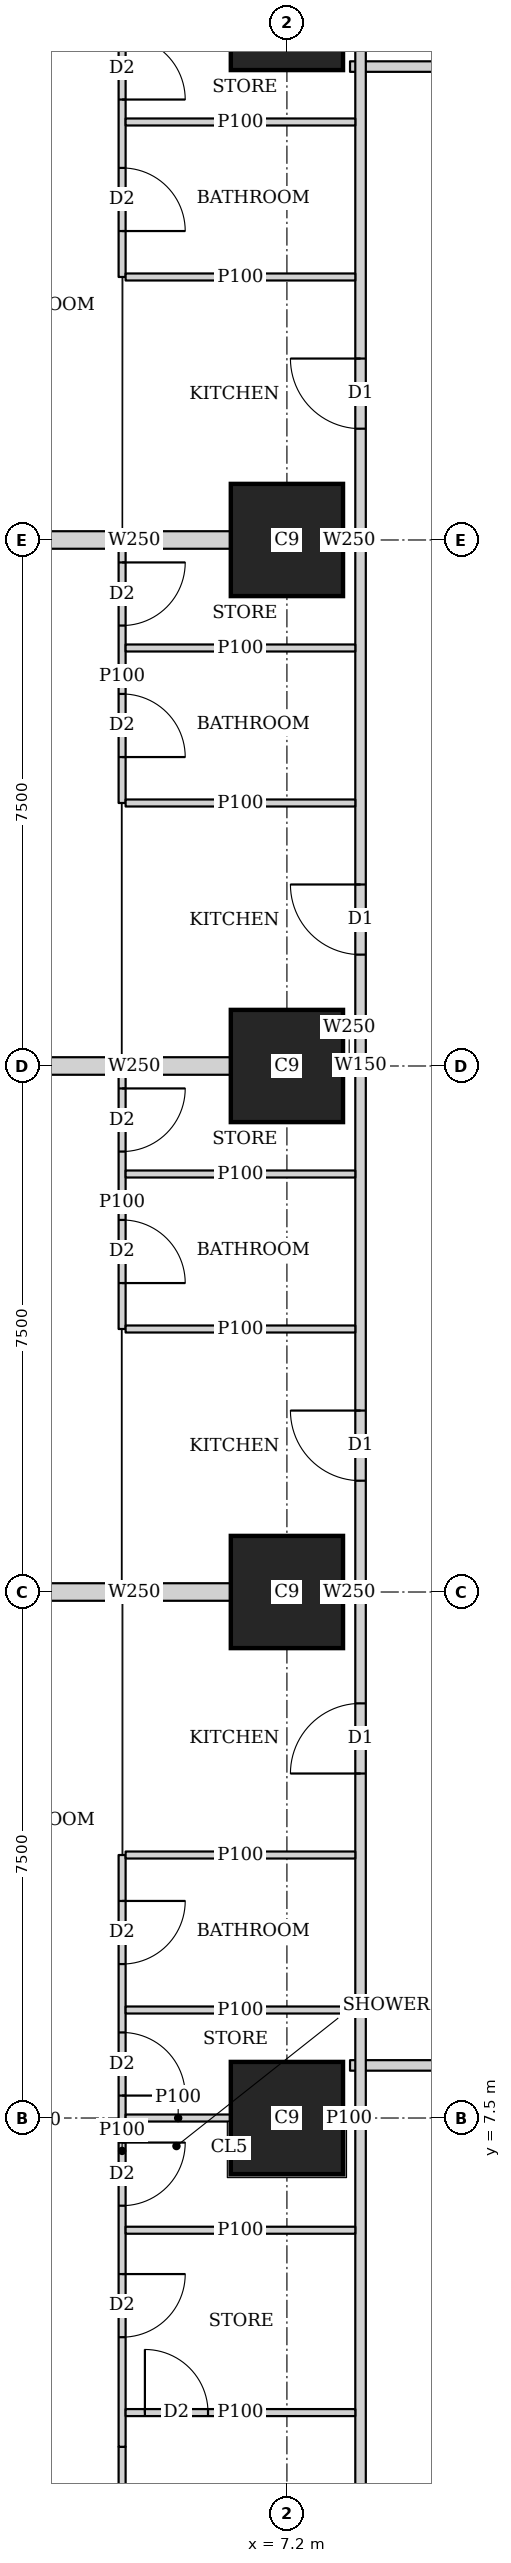
"""IFC4 building model, lengths in metres.
Left out: names, types, materials, properties, quantities, classifications, styles, units other than length and angle.
Written with IfcOpenShell. Run it as: python <this file> out.ifc"""

import sys

from ifc_helpers import new_model, si_unit, direction, frame, frame_2d, origin, origin_2d, place, context, subcontext, project, spatial, rectangle, extrude, element, fill, save


model = new_model("IFC4")
c1 = context("Model", 3, precision=1e-05, world=origin(), true_north=direction((0.0, 1.0)))
c2 = subcontext(c1, "Body", "Model", "MODEL_VIEW")
j1 = project(units=[si_unit("LENGTHUNIT", "METRE"), si_unit("PLANEANGLEUNIT", "RADIAN")], contexts=[c1])
p1 = place(None, origin())
s1 = spatial("IfcSite", under=j1, at=p1, CompositionType="ELEMENT")
p2 = place(p1, origin())
s2 = spatial("IfcBuilding", under=s1, at=p2, CompositionType="ELEMENT")
p3 = place(p2, frame((0.0, 0.0, 126.65)))
s3 = spatial("IfcBuildingStorey", under=s2, at=p3, CompositionType="ELEMENT", Elevation=126.65)
for number, where, z_axis, x_axis in (
    (1, (7.2, 7.5, 0.0), (0.0, 0.0, 1.0), (1.0, 0.0, 0.0)),
    (2, (7.2, 15.0, 0.0), (0.0, 0.0, 1.0), (1.0, 0.0, 0.0)),
    (3, (7.2, 22.5, 0.0), (0.0, 0.0, 1.0), (1.0, 0.0, 0.0)),
    (4, (7.2, 30.0, 0.0), (0.0, 0.0, 1.0), (1.0, 0.0, 0.0)),
    (5, (7.2, 37.5, 0.0), (0.0, 0.0, 1.0), (1.0, 0.0, 0.0)),
):
    element("IfcColumn", number, at=place(p3, frame(where, z_axis=z_axis, x_axis=x_axis)), inside=s3, PredefinedType="COLUMN", context=c2, shape_type="SweptSolid", body=[
        extrude(rectangle(XDim=1.6, YDim=1.6, at=origin_2d()), origin(), (0.0, 0.0, 1.0), 3.75),
    ])
p4 = place(p3, frame((8.25, 2.126, 0.0), z_axis=(0.0, 0.0, 1.0), x_axis=(0.0, 1.0, 0.0)))
e6 = element("IfcWall", 6, at=p4, inside=s3, PredefinedType="SOLIDWALL", context=c2, shape_type="SweptSolid", body=[
    extrude(rectangle(XDim=40.773, YDim=0.15, at=frame_2d((20.386, 0.0))), origin(), (0.0, 0.0, 1.0), 3.45),
])
p5 = place(p4, frame((10.286, 0.0, 0.0)))
e7 = element("IfcOpeningElement", 7, at=p5, cuts=e6, PredefinedType="OPENING", context=c2, shape_type="SweptSolid", body=[
    extrude(rectangle(XDim=1.0, YDim=2.1, at=frame_2d((0.5, 1.05))), frame((0.0, 0.085, 0.0), z_axis=(0.0, -1.0, 0.0), x_axis=(1.0, 0.0, 0.0)), (0.0, 0.0, 1.0), 0.17),
])
p6 = place(p4, frame((14.461, 0.0, 0.0)))
e8 = element("IfcOpeningElement", 8, at=p6, cuts=e6, PredefinedType="OPENING", context=c2, shape_type="SweptSolid", body=[
    extrude(rectangle(XDim=1.0, YDim=2.1, at=frame_2d((0.5, 1.05))), frame((0.0, 0.085, 0.0), z_axis=(0.0, -1.0, 0.0), x_axis=(1.0, 0.0, 0.0)), (0.0, 0.0, 1.0), 0.17),
])
p7 = place(p4, frame((21.962, 0.0, 0.0)))
e9 = element("IfcOpeningElement", 9, at=p7, cuts=e6, PredefinedType="OPENING", context=c2, shape_type="SweptSolid", body=[
    extrude(rectangle(XDim=1.0, YDim=2.1, at=frame_2d((0.5, 1.05))), frame((0.0, 0.085, 0.0), z_axis=(0.0, -1.0, 0.0), x_axis=(1.0, 0.0, 0.0)), (0.0, 0.0, 1.0), 0.17),
])
p8 = place(p4, frame((29.461, 0.0, 0.0)))
e10 = element("IfcOpeningElement", 10, at=p8, cuts=e6, PredefinedType="OPENING", context=c2, shape_type="SweptSolid", body=[
    extrude(rectangle(XDim=1.0, YDim=2.1, at=frame_2d((0.5, 1.05))), frame((0.0, 0.085, 0.0), z_axis=(0.0, -1.0, 0.0), x_axis=(1.0, 0.0, 0.0)), (0.0, 0.0, 1.0), 0.17),
])
p9 = place(p3, frame((13.599, 8.25, 0.0), z_axis=(0.0, 0.0, 1.0), x_axis=(-1.0, 0.0, 0.0)))
e11 = element("IfcWall", 11, at=p9, inside=s3, PredefinedType="SOLIDWALL", context=c2, shape_type="SweptSolid", body=[
    extrude(rectangle(XDim=5.499, YDim=0.15, at=frame_2d((2.75, 0.0))), origin(), (0.0, 0.0, 1.0), 3.45),
])
p10 = place(p9, frame((1.774, 0.0, 0.0)))
e12 = element("IfcOpeningElement", 12, at=p10, cuts=e11, PredefinedType="OPENING", context=c2, shape_type="SweptSolid", body=[
    extrude(rectangle(XDim=1.0, YDim=2.1, at=frame_2d((0.5, 1.05))), frame((0.0, 0.085, 0.0), z_axis=(0.0, -1.0, 0.0), x_axis=(1.0, 0.0, 0.0)), (0.0, 0.0, 1.0), 0.17),
])
p11 = place(p3, frame((8.1, 36.75, 0.0), z_axis=(0.0, 0.0, 1.0), x_axis=(1.0, 0.0, 0.0)))
e13 = element("IfcWall", 13, at=p11, inside=s3, PredefinedType="SOLIDWALL", context=c2, shape_type="SweptSolid", body=[
    extrude(rectangle(XDim=5.499, YDim=0.15, at=frame_2d((2.75, 0.0))), origin(), (0.0, 0.0, 1.0), 3.45),
])
p12 = place(p11, frame((2.725, 0.0, 0.0)))
e14 = element("IfcOpeningElement", 14, at=p12, cuts=e13, PredefinedType="OPENING", context=c2, shape_type="SweptSolid", body=[
    extrude(rectangle(XDim=1.0, YDim=2.1, at=frame_2d((0.5, 1.05))), frame((0.0, 0.085, 0.0), z_axis=(0.0, -1.0, 0.0), x_axis=(1.0, 0.0, 0.0)), (0.0, 0.0, 1.0), 0.17),
])
p13 = place(p3, frame((4.85, 0.326, 0.0), z_axis=(0.0, 0.0, 1.0), x_axis=(0.0, 1.0, 0.0)))
e15 = element("IfcWall", 15, at=p13, inside=s3, PredefinedType="PARTITIONING", context=c2, shape_type="SweptSolid", body=[
    extrude(rectangle(XDim=2.486, YDim=0.1, at=frame_2d((1.243, 0.0))), origin(), (0.0, 0.0, 1.0), 2.0),
])
p14 = place(p3, frame((4.85, 2.812, 0.0), z_axis=(0.0, 0.0, 1.0), x_axis=(0.0, 1.0, 0.0)))
e16 = element("IfcWall", 16, at=p14, inside=s3, PredefinedType="PARTITIONING", context=c2, shape_type="SweptSolid", body=[
    extrude(rectangle(XDim=8.438, YDim=0.1, at=frame_2d((4.219, 0.0))), origin(), (0.0, 0.0, 1.0), 3.45),
])
p15 = place(p14, frame((6.883, 0.0, 0.0)))
e17 = element("IfcOpeningElement", 17, at=p15, cuts=e16, PredefinedType="OPENING", context=c2, shape_type="SweptSolid", body=[
    extrude(rectangle(XDim=0.9, YDim=2.1, at=frame_2d((0.45, 1.05))), frame((0.0, 0.06, 0.0), z_axis=(0.0, -1.0, 0.0), x_axis=(1.0, 0.0, 0.0)), (0.0, 0.0, 1.0), 0.12),
])
p16 = place(p14, frame((3.438, 0.0, 0.0)))
e18 = element("IfcOpeningElement", 18, at=p16, cuts=e16, PredefinedType="OPENING", context=c2, shape_type="SweptSolid", body=[
    extrude(rectangle(XDim=0.9, YDim=2.1, at=frame_2d((0.45, 1.05))), frame((0.0, 0.06, 0.0), z_axis=(0.0, -1.0, 0.0), x_axis=(1.0, 0.0, 0.0)), (0.0, 0.0, 1.0), 0.12),
])
p17 = place(p14, frame((5.008, 0.0, 0.0)))
e19 = element("IfcOpeningElement", 19, at=p17, cuts=e16, PredefinedType="OPENING", context=c2, shape_type="SweptSolid", body=[
    extrude(rectangle(XDim=0.9, YDim=2.1, at=frame_2d((0.45, 1.05))), frame((0.0, 0.06, 0.0), z_axis=(0.0, -1.0, 0.0), x_axis=(1.0, 0.0, 0.0)), (0.0, 0.0, 1.0), 0.12),
])
p18 = place(p14, frame((1.563, 0.0, 0.0)))
e20 = element("IfcOpeningElement", 20, at=p18, cuts=e16, PredefinedType="OPENING", context=c2, shape_type="SweptSolid", body=[
    extrude(rectangle(XDim=0.9, YDim=2.1, at=frame_2d((0.45, 1.05))), frame((0.0, 0.06, 0.0), z_axis=(0.0, -1.0, 0.0), x_axis=(1.0, 0.0, 0.0)), (0.0, 0.0, 1.0), 0.12),
])
p19 = place(p3, frame((4.9, 7.5, 0.0), z_axis=(0.0, 0.0, 1.0), x_axis=(1.0, 0.0, 0.0)))
e21 = element("IfcWall", 21, at=p19, inside=s3, PredefinedType="PARTITIONING", context=c2, shape_type="SweptSolid", body=[
    extrude(rectangle(XDim=1.499, YDim=0.1, at=frame_2d((0.75, 0.0))), origin(), (0.0, 0.0, 1.0), 3.45),
])
p20 = place(p3, frame((8.001, 7.5, 0.0), z_axis=(0.0, 0.0, 1.0), x_axis=(1.0, 0.0, 0.0)))
e22 = element("IfcWall", 22, at=p20, inside=s3, PredefinedType="PARTITIONING", context=c2, shape_type="SweptSolid", body=[
    extrude(rectangle(XDim=0.174, YDim=0.1, at=frame_2d((0.087, 0.0))), origin(), (0.0, 0.0, 1.0), 3.45),
])
for number, where, z_axis, x_axis in (
    (23, (4.9, 11.25, 0.0), (0.0, 0.0, 1.0), (1.0, 0.0, 0.0)),
    (24, (4.9, 9.04, 0.0), (0.0, 0.0, 1.0), (1.0, 0.0, 0.0)),
    (25, (4.9, 5.9, 0.0), (0.0, 0.0, 1.0), (1.0, 0.0, 0.0)),
):
    element("IfcWall", number, at=place(p3, frame(where, z_axis=z_axis, x_axis=x_axis)), inside=s3, PredefinedType="PARTITIONING", context=c2, shape_type="SweptSolid", body=[
        extrude(rectangle(XDim=3.275, YDim=0.1, at=frame_2d((1.638, 0.0))), origin(), (0.0, 0.0, 1.0), 3.45),
    ])
p21 = place(p3, frame((4.85, 18.75, 0.0), z_axis=(0.0, 0.0, 1.0), x_axis=(0.0, 1.0, 0.0)))
e26 = element("IfcWall", 26, at=p21, inside=s3, PredefinedType="PARTITIONING", context=c2, shape_type="SweptSolid", body=[
    extrude(rectangle(XDim=3.625, YDim=0.1, at=frame_2d((1.812, 0.0))), origin(), (0.0, 0.0, 1.0), 3.45),
])
p22 = place(p21, frame((0.655, 0.0, 0.0)))
e27 = element("IfcOpeningElement", 27, at=p22, cuts=e26, PredefinedType="OPENING", context=c2, shape_type="SweptSolid", body=[
    extrude(rectangle(XDim=0.9, YDim=2.1, at=frame_2d((0.45, 1.05))), frame((0.0, 0.06, 0.0), z_axis=(0.0, -1.0, 0.0), x_axis=(1.0, 0.0, 0.0)), (0.0, 0.0, 1.0), 0.12),
])
p23 = place(p21, frame((2.53, 0.0, 0.0)))
e28 = element("IfcOpeningElement", 28, at=p23, cuts=e26, PredefinedType="OPENING", context=c2, shape_type="SweptSolid", body=[
    extrude(rectangle(XDim=0.9, YDim=2.1, at=frame_2d((0.45, 1.05))), frame((0.0, 0.06, 0.0), z_axis=(0.0, -1.0, 0.0), x_axis=(1.0, 0.0, 0.0)), (0.0, 0.0, 1.0), 0.12),
])
for number, where, z_axis, x_axis in (
    (29, (4.9, 18.75, 0.0), (0.0, 0.0, 1.0), (1.0, 0.0, 0.0)),
    (30, (4.9, 20.96, 0.0), (0.0, 0.0, 1.0), (1.0, 0.0, 0.0)),
):
    element("IfcWall", number, at=place(p3, frame(where, z_axis=z_axis, x_axis=x_axis)), inside=s3, PredefinedType="PARTITIONING", context=c2, shape_type="SweptSolid", body=[
        extrude(rectangle(XDim=3.275, YDim=0.1, at=frame_2d((1.638, 0.0))), origin(), (0.0, 0.0, 1.0), 3.45),
    ])
p24 = place(p3, frame((3.65, 15.0, 0.0), z_axis=(0.0, 0.0, 1.0), x_axis=(1.0, 0.0, 0.0)))
e31 = element("IfcWall", 31, at=p24, inside=s3, PredefinedType="SOLIDWALL", context=c2, shape_type="SweptSolid", body=[
    extrude(rectangle(XDim=2.749, YDim=0.25, at=frame_2d((1.375, 0.0))), origin(), (0.0, 0.0, 1.0), 3.45),
])
p25 = place(p3, frame((8.001, 15.0, 0.0), z_axis=(0.0, 0.0, 1.0), x_axis=(1.0, 0.0, 0.0)))
e32 = element("IfcWall", 32, at=p25, inside=s3, PredefinedType="SOLIDWALL", context=c2, shape_type="SweptSolid", body=[
    extrude(rectangle(XDim=0.174, YDim=0.25, at=frame_2d((0.087, 0.0))), origin(), (0.0, 0.0, 1.0), 3.45),
])
p26 = place(p3, frame((4.85, 26.25, 0.0), z_axis=(0.0, 0.0, 1.0), x_axis=(0.0, 1.0, 0.0)))
e33 = element("IfcWall", 33, at=p26, inside=s3, PredefinedType="PARTITIONING", context=c2, shape_type="SweptSolid", body=[
    extrude(rectangle(XDim=3.625, YDim=0.1, at=frame_2d((1.812, 0.0))), origin(), (0.0, 0.0, 1.0), 3.45),
])
p27 = place(p26, frame((0.655, 0.0, 0.0)))
e34 = element("IfcOpeningElement", 34, at=p27, cuts=e33, PredefinedType="OPENING", context=c2, shape_type="SweptSolid", body=[
    extrude(rectangle(XDim=0.9, YDim=2.1, at=frame_2d((0.45, 1.05))), frame((0.0, 0.06, 0.0), z_axis=(0.0, -1.0, 0.0), x_axis=(1.0, 0.0, 0.0)), (0.0, 0.0, 1.0), 0.12),
])
p28 = place(p26, frame((2.53, 0.0, 0.0)))
e35 = element("IfcOpeningElement", 35, at=p28, cuts=e33, PredefinedType="OPENING", context=c2, shape_type="SweptSolid", body=[
    extrude(rectangle(XDim=0.9, YDim=2.1, at=frame_2d((0.45, 1.05))), frame((0.0, 0.06, 0.0), z_axis=(0.0, -1.0, 0.0), x_axis=(1.0, 0.0, 0.0)), (0.0, 0.0, 1.0), 0.12),
])
for number, where, z_axis, x_axis in (
    (36, (4.9, 26.25, 0.0), (0.0, 0.0, 1.0), (1.0, 0.0, 0.0)),
    (37, (4.9, 28.46, 0.0), (0.0, 0.0, 1.0), (1.0, 0.0, 0.0)),
):
    element("IfcWall", number, at=place(p3, frame(where, z_axis=z_axis, x_axis=x_axis)), inside=s3, PredefinedType="PARTITIONING", context=c2, shape_type="SweptSolid", body=[
        extrude(rectangle(XDim=3.275, YDim=0.1, at=frame_2d((1.638, 0.0))), origin(), (0.0, 0.0, 1.0), 3.45),
    ])
p29 = place(p3, frame((3.65, 22.5, 0.0), z_axis=(0.0, 0.0, 1.0), x_axis=(1.0, 0.0, 0.0)))
e38 = element("IfcWall", 38, at=p29, inside=s3, PredefinedType="SOLIDWALL", context=c2, shape_type="SweptSolid", body=[
    extrude(rectangle(XDim=2.749, YDim=0.25, at=frame_2d((1.375, 0.0))), origin(), (0.0, 0.0, 1.0), 3.45),
])
p30 = place(p3, frame((8.001, 22.5, 0.0), z_axis=(0.0, 0.0, 1.0), x_axis=(1.0, 0.0, 0.0)))
e39 = element("IfcWall", 39, at=p30, inside=s3, PredefinedType="SOLIDWALL", context=c2, shape_type="SweptSolid", body=[
    extrude(rectangle(XDim=0.174, YDim=0.25, at=frame_2d((0.087, 0.0))), origin(), (0.0, 0.0, 1.0), 3.45),
])
p31 = place(p3, frame((4.85, 33.75, 0.0), z_axis=(0.0, 0.0, 1.0), x_axis=(0.0, 1.0, 0.0)))
e40 = element("IfcWall", 40, at=p31, inside=s3, PredefinedType="PARTITIONING", context=c2, shape_type="SweptSolid", body=[
    extrude(rectangle(XDim=8.449, YDim=0.1, at=frame_2d((4.225, 0.0))), origin(), (0.0, 0.0, 1.0), 3.45),
])
p32 = place(p31, frame((0.655, 0.0, 0.0)))
e41 = element("IfcOpeningElement", 41, at=p32, cuts=e40, PredefinedType="OPENING", context=c2, shape_type="SweptSolid", body=[
    extrude(rectangle(XDim=0.9, YDim=2.1, at=frame_2d((0.45, 1.05))), frame((0.0, 0.06, 0.0), z_axis=(0.0, -1.0, 0.0), x_axis=(1.0, 0.0, 0.0)), (0.0, 0.0, 1.0), 0.12),
])
p33 = place(p31, frame((4.1, 0.0, 0.0)))
e42 = element("IfcOpeningElement", 42, at=p33, cuts=e40, PredefinedType="OPENING", context=c2, shape_type="SweptSolid", body=[
    extrude(rectangle(XDim=0.9, YDim=2.1, at=frame_2d((0.45, 1.05))), frame((0.0, 0.06, 0.0), z_axis=(0.0, -1.0, 0.0), x_axis=(1.0, 0.0, 0.0)), (0.0, 0.0, 1.0), 0.12),
])
p34 = place(p31, frame((2.53, 0.0, 0.0)))
e43 = element("IfcOpeningElement", 43, at=p34, cuts=e40, PredefinedType="OPENING", context=c2, shape_type="SweptSolid", body=[
    extrude(rectangle(XDim=0.9, YDim=2.1, at=frame_2d((0.45, 1.05))), frame((0.0, 0.06, 0.0), z_axis=(0.0, -1.0, 0.0), x_axis=(1.0, 0.0, 0.0)), (0.0, 0.0, 1.0), 0.12),
])
p35 = place(p31, frame((5.975, 0.0, 0.0)))
e44 = element("IfcOpeningElement", 44, at=p35, cuts=e40, PredefinedType="OPENING", context=c2, shape_type="SweptSolid", body=[
    extrude(rectangle(XDim=0.9, YDim=2.1, at=frame_2d((0.45, 1.05))), frame((0.0, 0.06, 0.0), z_axis=(0.0, -1.0, 0.0), x_axis=(1.0, 0.0, 0.0)), (0.0, 0.0, 1.0), 0.12),
])
for number, where, z_axis, x_axis in (
    (45, (4.9, 33.75, 0.0), (0.0, 0.0, 1.0), (1.0, 0.0, 0.0)),
    (46, (4.9, 35.96, 0.0), (0.0, 0.0, 1.0), (1.0, 0.0, 0.0)),
):
    element("IfcWall", number, at=place(p3, frame(where, z_axis=z_axis, x_axis=x_axis)), inside=s3, PredefinedType="PARTITIONING", context=c2, shape_type="SweptSolid", body=[
        extrude(rectangle(XDim=3.275, YDim=0.1, at=frame_2d((1.638, 0.0))), origin(), (0.0, 0.0, 1.0), 3.45),
    ])
p36 = place(p3, frame((3.65, 30.0, 0.0), z_axis=(0.0, 0.0, 1.0), x_axis=(1.0, 0.0, 0.0)))
e47 = element("IfcWall", 47, at=p36, inside=s3, PredefinedType="SOLIDWALL", context=c2, shape_type="SweptSolid", body=[
    extrude(rectangle(XDim=2.749, YDim=0.25, at=frame_2d((1.375, 0.0))), origin(), (0.0, 0.0, 1.0), 3.45),
])
p37 = place(p3, frame((8.001, 30.0, 0.0), z_axis=(0.0, 0.0, 1.0), x_axis=(1.0, 0.0, 0.0)))
e48 = element("IfcWall", 48, at=p37, inside=s3, PredefinedType="SOLIDWALL", context=c2, shape_type="SweptSolid", body=[
    extrude(rectangle(XDim=0.174, YDim=0.25, at=frame_2d((0.087, 0.0))), origin(), (0.0, 0.0, 1.0), 3.45),
])
p38 = place(p3, frame((8.175, 3.3, 0.0), z_axis=(0.0, 0.0, 1.0), x_axis=(-1.0, 0.0, 0.0)))
e49 = element("IfcWall", 49, at=p38, inside=s3, PredefinedType="PARTITIONING", context=c2, shape_type="SweptSolid", body=[
    extrude(rectangle(XDim=3.275, YDim=0.1, at=frame_2d((1.638, 0.0))), origin(), (0.0, 0.0, 1.0), 3.45),
])
p39 = place(p38, frame((2.1, 0.0, 0.0)))
e50 = element("IfcOpeningElement", 50, at=p39, cuts=e49, PredefinedType="OPENING", context=c2, shape_type="SweptSolid", body=[
    extrude(rectangle(XDim=0.9, YDim=2.1, at=frame_2d((0.45, 1.05))), frame((0.0, 0.06, 0.0), z_axis=(0.0, -1.0, 0.0), x_axis=(1.0, 0.0, 0.0)), (0.0, 0.0, 1.0), 0.12),
])
p40 = place(p15, origin())
e51 = element("IfcDoor", 51, at=p40, inside=s3, OperationType="SINGLE_SWING_LEFT", PredefinedType="DOOR", context=c2, shape_type="SweptSolid", body=[
    extrude(rectangle(XDim=0.9, YDim=2.1, at=frame_2d((0.45, 1.05))), frame((0.0, 0.025, 0.0), z_axis=(0.0, -1.0, 0.0), x_axis=(1.0, 0.0, 0.0)), (0.0, 0.0, 1.0), 0.05),
])
fill(e17, e51)
p41 = place(p16, origin())
e52 = element("IfcDoor", 52, at=p41, inside=s3, OperationType="SINGLE_SWING_LEFT", PredefinedType="DOOR", context=c2, shape_type="SweptSolid", body=[
    extrude(rectangle(XDim=0.9, YDim=2.1, at=frame_2d((0.45, 1.05))), frame((0.0, 0.025, 0.0), z_axis=(0.0, -1.0, 0.0), x_axis=(1.0, 0.0, 0.0)), (0.0, 0.0, 1.0), 0.05),
])
fill(e18, e52)
p42 = place(p17, origin())
e53 = element("IfcDoor", 53, at=p42, inside=s3, OperationType="SINGLE_SWING_RIGHT", PredefinedType="DOOR", context=c2, shape_type="SweptSolid", body=[
    extrude(rectangle(XDim=0.9, YDim=2.1, at=frame_2d((0.45, 1.05))), frame((0.0, 0.025, 0.0), z_axis=(0.0, -1.0, 0.0), x_axis=(1.0, 0.0, 0.0)), (0.0, 0.0, 1.0), 0.05),
])
fill(e19, e53)
p43 = place(p18, origin())
e54 = element("IfcDoor", 54, at=p43, inside=s3, OperationType="SINGLE_SWING_LEFT", PredefinedType="DOOR", context=c2, shape_type="SweptSolid", body=[
    extrude(rectangle(XDim=0.9, YDim=2.1, at=frame_2d((0.45, 1.05))), frame((0.0, 0.025, 0.0), z_axis=(0.0, -1.0, 0.0), x_axis=(1.0, 0.0, 0.0)), (0.0, 0.0, 1.0), 0.05),
])
fill(e20, e54)
p44 = place(p5, origin())
e55 = element("IfcDoor", 55, at=p44, inside=s3, OperationType="SINGLE_SWING_LEFT", PredefinedType="DOOR", context=c2, shape_type="SweptSolid", body=[
    extrude(rectangle(XDim=1.0, YDim=2.1, at=frame_2d((0.5, 1.05))), frame((0.0, 0.025, 0.0), z_axis=(0.0, -1.0, 0.0), x_axis=(1.0, 0.0, 0.0)), (0.0, 0.0, 1.0), 0.05),
])
fill(e7, e55)
p45 = place(p22, origin())
e56 = element("IfcDoor", 56, at=p45, inside=s3, OperationType="SINGLE_SWING_RIGHT", PredefinedType="DOOR", context=c2, shape_type="SweptSolid", body=[
    extrude(rectangle(XDim=0.9, YDim=2.1, at=frame_2d((0.45, 1.05))), frame((0.0, 0.025, 0.0), z_axis=(0.0, -1.0, 0.0), x_axis=(1.0, 0.0, 0.0)), (0.0, 0.0, 1.0), 0.05),
])
fill(e27, e56)
p46 = place(p23, origin())
e57 = element("IfcDoor", 57, at=p46, inside=s3, OperationType="SINGLE_SWING_LEFT", PredefinedType="DOOR", context=c2, shape_type="SweptSolid", body=[
    extrude(rectangle(XDim=0.9, YDim=2.1, at=frame_2d((0.45, 1.05))), frame((0.0, 0.025, 0.0), z_axis=(0.0, -1.0, 0.0), x_axis=(1.0, 0.0, 0.0)), (0.0, 0.0, 1.0), 0.05),
])
fill(e28, e57)
p47 = place(p6, origin())
e58 = element("IfcDoor", 58, at=p47, inside=s3, OperationType="SINGLE_SWING_RIGHT", PredefinedType="DOOR", context=c2, shape_type="SweptSolid", body=[
    extrude(rectangle(XDim=1.0, YDim=2.1, at=frame_2d((0.5, 1.05))), frame((0.0, 0.025, 0.0), z_axis=(0.0, -1.0, 0.0), x_axis=(1.0, 0.0, 0.0)), (0.0, 0.0, 1.0), 0.05),
])
fill(e8, e58)
p48 = place(p27, origin())
e59 = element("IfcDoor", 59, at=p48, inside=s3, OperationType="SINGLE_SWING_RIGHT", PredefinedType="DOOR", context=c2, shape_type="SweptSolid", body=[
    extrude(rectangle(XDim=0.9, YDim=2.1, at=frame_2d((0.45, 1.05))), frame((0.0, 0.025, 0.0), z_axis=(0.0, -1.0, 0.0), x_axis=(1.0, 0.0, 0.0)), (0.0, 0.0, 1.0), 0.05),
])
fill(e34, e59)
p49 = place(p28, origin())
e60 = element("IfcDoor", 60, at=p49, inside=s3, OperationType="SINGLE_SWING_LEFT", PredefinedType="DOOR", context=c2, shape_type="SweptSolid", body=[
    extrude(rectangle(XDim=0.9, YDim=2.1, at=frame_2d((0.45, 1.05))), frame((0.0, 0.025, 0.0), z_axis=(0.0, -1.0, 0.0), x_axis=(1.0, 0.0, 0.0)), (0.0, 0.0, 1.0), 0.05),
])
fill(e35, e60)
p50 = place(p7, origin())
e61 = element("IfcDoor", 61, at=p50, inside=s3, OperationType="SINGLE_SWING_RIGHT", PredefinedType="DOOR", context=c2, shape_type="SweptSolid", body=[
    extrude(rectangle(XDim=1.0, YDim=2.1, at=frame_2d((0.5, 1.05))), frame((0.0, 0.025, 0.0), z_axis=(0.0, -1.0, 0.0), x_axis=(1.0, 0.0, 0.0)), (0.0, 0.0, 1.0), 0.05),
])
fill(e9, e61)
p51 = place(p32, origin())
e62 = element("IfcDoor", 62, at=p51, inside=s3, OperationType="SINGLE_SWING_RIGHT", PredefinedType="DOOR", context=c2, shape_type="SweptSolid", body=[
    extrude(rectangle(XDim=0.9, YDim=2.1, at=frame_2d((0.45, 1.05))), frame((0.0, 0.025, 0.0), z_axis=(0.0, -1.0, 0.0), x_axis=(1.0, 0.0, 0.0)), (0.0, 0.0, 1.0), 0.05),
])
fill(e41, e62)
p52 = place(p34, origin())
e63 = element("IfcDoor", 63, at=p52, inside=s3, OperationType="SINGLE_SWING_RIGHT", PredefinedType="DOOR", context=c2, shape_type="SweptSolid", body=[
    extrude(rectangle(XDim=0.9, YDim=2.1, at=frame_2d((0.45, 1.05))), frame((0.0, 0.025, 0.0), z_axis=(0.0, -1.0, 0.0), x_axis=(1.0, 0.0, 0.0)), (0.0, 0.0, 1.0), 0.05),
])
fill(e43, e63)
p53 = place(p8, origin())
e64 = element("IfcDoor", 64, at=p53, inside=s3, OperationType="SINGLE_SWING_RIGHT", PredefinedType="DOOR", context=c2, shape_type="SweptSolid", body=[
    extrude(rectangle(XDim=1.0, YDim=2.1, at=frame_2d((0.5, 1.05))), frame((0.0, 0.025, 0.0), z_axis=(0.0, -1.0, 0.0), x_axis=(1.0, 0.0, 0.0)), (0.0, 0.0, 1.0), 0.05),
])
fill(e10, e64)
p54 = place(p39, origin())
e65 = element("IfcDoor", 65, at=p54, inside=s3, OperationType="SINGLE_SWING_LEFT", PredefinedType="DOOR", context=c2, shape_type="SweptSolid", body=[
    extrude(rectangle(XDim=0.9, YDim=2.1, at=frame_2d((0.45, 1.05))), frame((0.0, 0.025, 0.0), z_axis=(0.0, -1.0, 0.0), x_axis=(1.0, 0.0, 0.0)), (0.0, 0.0, 1.0), 0.05),
])
fill(e50, e65)
save(model, sys.argv[1])
